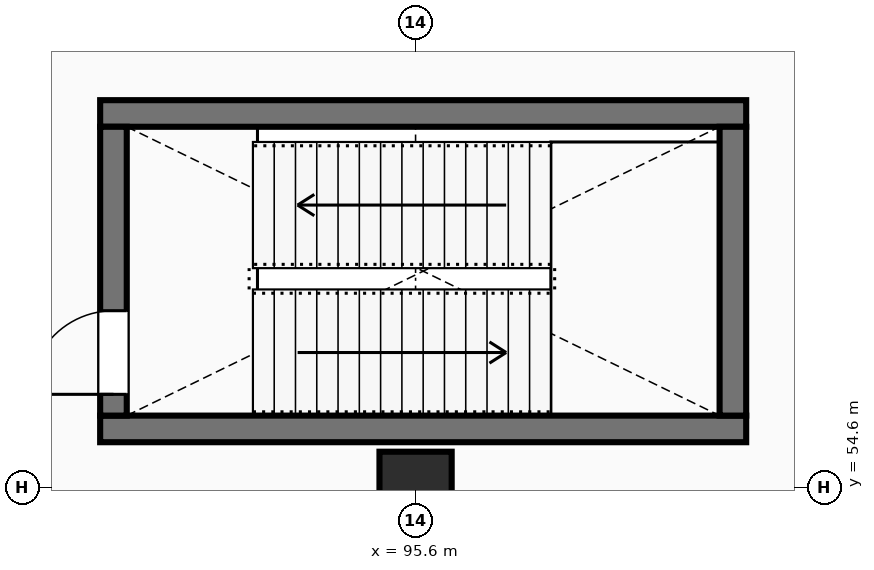
"""IFC4 building model, lengths in metres.
Left out: names, types, materials, properties, quantities, classifications, styles, units other than length and angle.
Written with IfcOpenShell. Run it as: python <this file> out.ifc"""

import sys

from ifc_helpers import new_model, si_unit, direction, frame, frame_2d, origin, origin_2d, place, context, subcontext, project, spatial, rectangle, extrude, element, fill, save


model = new_model("IFC4")
c1 = context("Model", 3, precision=1e-05, world=origin(), true_north=direction((0.0, 1.0)))
c2 = subcontext(c1, "Body", "Model", "MODEL_VIEW")
j1 = project(units=[si_unit("LENGTHUNIT", "METRE"), si_unit("PLANEANGLEUNIT", "RADIAN")], contexts=[c1])
p1 = place(None, origin())
s1 = spatial("IfcSite", under=j1, at=p1, CompositionType="ELEMENT")
p2 = place(p1, origin())
s2 = spatial("IfcBuilding", under=s1, at=p2, CompositionType="ELEMENT")
p3 = place(p2, origin())
s3 = spatial("IfcBuildingStorey", under=s2, at=p3, CompositionType="ELEMENT", Elevation=0.0)
p4 = place(p3, frame((95.6, 54.6, 0.0), z_axis=(0.0, 0.0, 1.0), x_axis=(1.0, 0.0, 0.0)))
e1 = element("IfcColumn", 1, at=p4, inside=s3, PredefinedType="COLUMN", context=c2, shape_type="SweptSolid", body=[
    extrude(rectangle(XDim=0.95, YDim=0.95, at=origin_2d()), origin(), (0.0, 0.0, 1.0), 5.4),
])
for number, where, z_axis, x_axis in (
    (2, (91.45, 55.375, 0.0), (0.0, 0.0, 1.0), (1.0, 0.0, 0.0)),
    (3, (99.95, 59.525, 0.0), (0.0, 0.0, 1.0), (-1.0, 0.0, 0.0)),
):
    element("IfcWall", number, at=place(p3, frame(where, z_axis=z_axis, x_axis=x_axis)), inside=s3, PredefinedType="SHEAR", context=c2, shape_type="SweptSolid", body=[
        extrude(rectangle(XDim=8.5, YDim=0.35, at=frame_2d((4.25, 0.0))), origin(), (0.0, 0.0, 1.0), 5.1),
    ])
p5 = place(p3, frame((91.625, 55.55, 0.0), z_axis=(0.0, 0.0, 1.0), x_axis=(0.0, 1.0, 0.0)))
e4 = element("IfcWall", 4, at=p5, inside=s3, PredefinedType="SHEAR", context=c2, shape_type="SweptSolid", body=[
    extrude(rectangle(XDim=3.8, YDim=0.35, at=frame_2d((1.9, 0.0))), origin(), (0.0, 0.0, 1.0), 5.1),
])
p6 = place(p5, frame((0.28, 0.0, 0.0)))
e5 = element("IfcOpeningElement", 5, at=p6, cuts=e4, PredefinedType="OPENING", context=c2, shape_type="SweptSolid", body=[
    extrude(rectangle(XDim=1.1, YDim=2.08, at=frame_2d((0.55, 1.04))), frame((0.0, 0.185, 0.0), z_axis=(0.0, -1.0, 0.0), x_axis=(1.0, 0.0, 0.0)), (0.0, 0.0, 1.0), 0.37),
])
p7 = place(p3, frame((99.775, 59.35, 0.0), z_axis=(0.0, 0.0, 1.0), x_axis=(0.0, -1.0, 0.0)))
e6 = element("IfcWall", 6, at=p7, inside=s3, PredefinedType="SHEAR", context=c2, shape_type="SweptSolid", body=[
    extrude(rectangle(XDim=3.8, YDim=0.35, at=frame_2d((1.9, 0.0))), origin(), (0.0, 0.0, 1.0), 5.1),
])
p8 = place(p6, origin())
e7 = element("IfcDoor", 7, at=p8, inside=s3, OperationType="SINGLE_SWING_LEFT", PredefinedType="DOOR", context=c2, shape_type="SweptSolid", body=[
    extrude(rectangle(XDim=1.1, YDim=2.08, at=frame_2d((0.55, 1.04))), frame((0.0, 0.025, 0.0), z_axis=(0.0, -1.0, 0.0), x_axis=(1.0, 0.0, 0.0)), (0.0, 0.0, 1.0), 0.05),
])
fill(e5, e7)
save(model, sys.argv[1])
